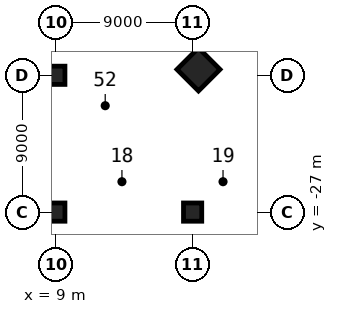
"""IFC4 building model, lengths in metres.
Left out: names, types, materials, properties, quantities, classifications, styles, units other than length and angle.
Written with IfcOpenShell. Run it as: python <this file> out.ifc"""

import sys

from ifc_helpers import new_model, si_unit, direction, frame, origin, origin_2d, place, context, subcontext, project, spatial, rectangle, extrude, element, save


model = new_model("IFC4")
c1 = context("Model", 3, precision=1e-05, world=origin(), true_north=direction((0.0, 1.0)))
c2 = subcontext(c1, "Body", "Model", "MODEL_VIEW")
j1 = project(units=[si_unit("LENGTHUNIT", "METRE"), si_unit("PLANEANGLEUNIT", "RADIAN")], contexts=[c1])
p1 = place(None, origin())
s1 = spatial("IfcSite", under=j1, at=p1, CompositionType="ELEMENT")
p2 = place(p1, origin())
s2 = spatial("IfcBuilding", under=s1, at=p2, CompositionType="ELEMENT")
p3 = place(p2, frame((0.0, 0.0, -9.0)))
s3 = spatial("IfcBuildingStorey", under=s2, at=p3, CompositionType="ELEMENT", Elevation=-9.0)
for number, where, z_axis, x_axis in (
    (1, (9.0, -27.0, 0.0), (0.0, 0.0, 1.0), (1.0, 0.0, 0.0)),
    (2, (9.0, -18.0, 0.0), (0.0, 0.0, 1.0), (1.0, 0.0, 0.0)),
    (3, (18.0, -27.0, 0.0), (0.0, 0.0, 1.0), (1.0, 0.0, 0.0)),
):
    element("IfcColumn", number, at=place(p3, frame(where, z_axis=z_axis, x_axis=x_axis)), inside=s3, PredefinedType="COLUMN", context=c2, shape_type="SweptSolid", body=[
        extrude(rectangle(XDim=1.2, YDim=1.2, at=origin_2d()), origin(), (0.0, 0.0, 1.0), 4.5),
    ])
p4 = place(p3, frame((18.386, -17.614, 0.0), z_axis=(0.0, 0.0, 1.0), x_axis=(-0.707106781187, -0.707106781187, 0.0)))
e4 = element("IfcColumn", 4, at=p4, inside=s3, PredefinedType="COLUMN", context=c2, shape_type="SweptSolid", body=[
    extrude(rectangle(XDim=2.0, YDim=2.0, at=origin_2d()), origin(), (0.0, 0.0, 1.0), 4.5),
])
save(model, sys.argv[1])
